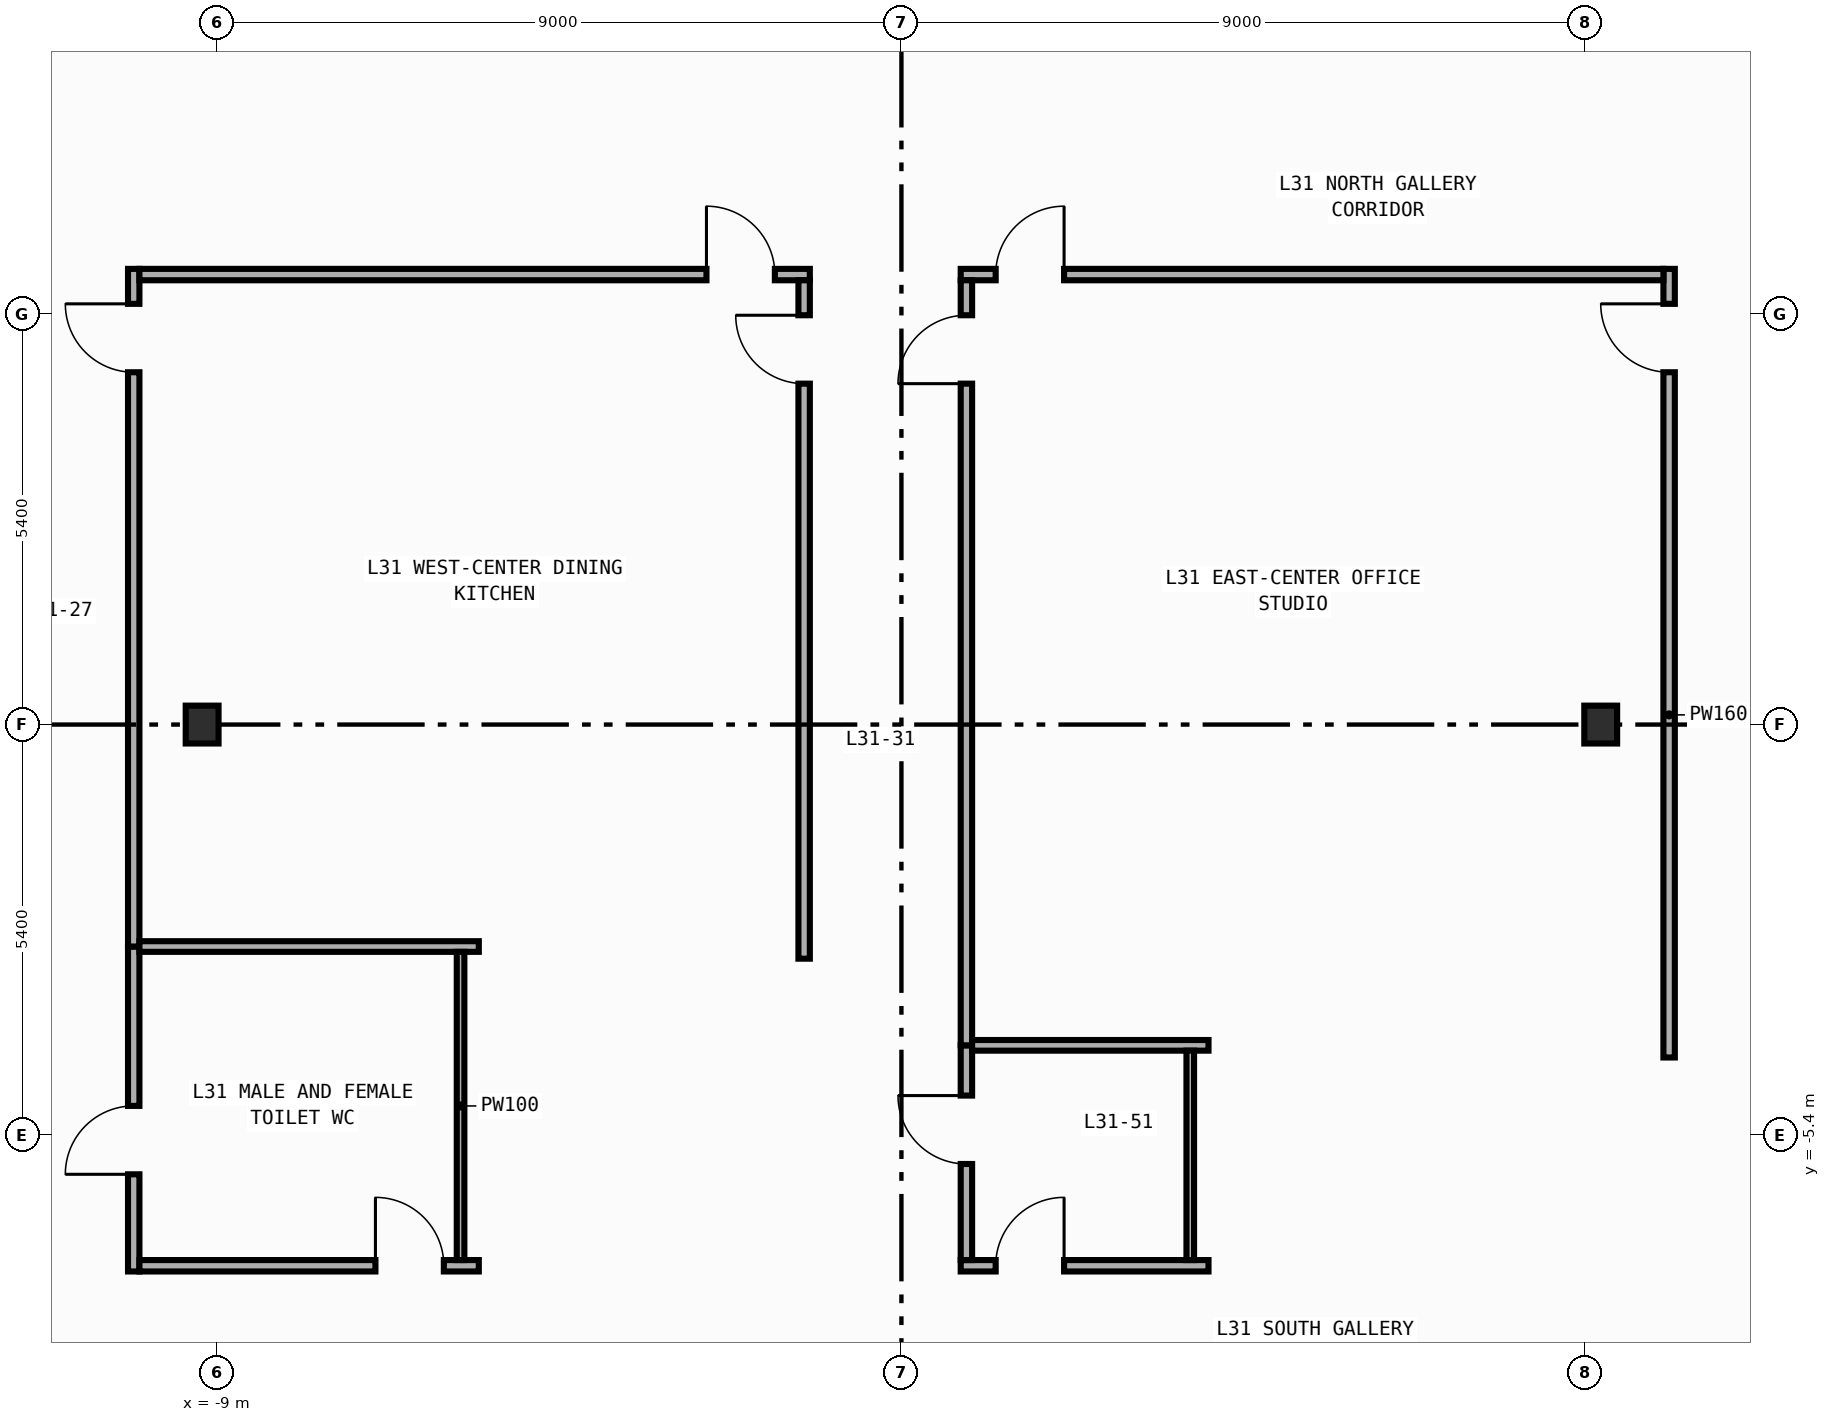
"""IFC4 building model, lengths in metres.
Left out: names, types, materials, properties, quantities, classifications, styles, units other than length and angle.
Written with IfcOpenShell. Run it as: python <this file> out.ifc"""

import sys

from ifc_helpers import new_model, si_unit, direction, frame, frame_2d, origin, origin_2d, place, context, subcontext, project, spatial, rectangle, i_section, extrude, element, fill, save


model = new_model("IFC4")
c1 = context("Model", 3, precision=1e-05, world=origin(), true_north=direction((0.0, 1.0)))
c2 = subcontext(c1, "Body", "Model", "MODEL_VIEW")
j1 = project(units=[si_unit("LENGTHUNIT", "METRE"), si_unit("PLANEANGLEUNIT", "RADIAN")], contexts=[c1])
p1 = place(None, origin())
s1 = spatial("IfcSite", under=j1, at=p1, CompositionType="ELEMENT")
p2 = place(p1, origin())
s2 = spatial("IfcBuilding", under=s1, at=p2, CompositionType="ELEMENT")
p3 = place(p2, frame((0.0, 0.0, 135.2)))
s3 = spatial("IfcBuildingStorey", under=s2, at=p3, CompositionType="ELEMENT", Elevation=135.2)
for number, where, z_axis, x_axis in (
    (1, (-9.2, 0.0, 0.0), (0.0, 0.0, 1.0), (1.0, 0.0, 0.0)),
    (2, (9.2, 0.0, 0.0), (0.0, 0.0, 1.0), (1.0, 0.0, 0.0)),
):
    element("IfcColumn", number, at=place(p3, frame(where, z_axis=z_axis, x_axis=x_axis)), inside=s3, PredefinedType="COLUMN", context=c2, shape_type="SweptSolid", body=[
        extrude(i_section(OverallWidth=0.432, OverallDepth=0.498, WebThickness=0.045, FlangeThickness=0.07, FilletRadius=0.022, at=origin_2d()), origin(), (0.0, 0.0, 1.0), 4.2),
    ])
p4 = place(p3, frame((-10.1, -7.195, 0.0), z_axis=(0.0, 0.0, 1.0), x_axis=(0.0, 1.0, 0.0)))
e3 = element("IfcWall", 3, at=p4, inside=s3, PredefinedType="PARTITIONING", context=c2, shape_type="SweptSolid", body=[
    extrude(rectangle(XDim=4.275, YDim=0.15, at=frame_2d((2.138, 0.0))), origin(), (0.0, 0.0, 1.0), 3.94),
])
p5 = place(p4, frame((1.278, 0.0, 0.0)))
e4 = element("IfcOpeningElement", 4, at=p5, cuts=e3, PredefinedType="OPENING", context=c2, shape_type="SweptSolid", body=[
    extrude(rectangle(XDim=0.9, YDim=2.15, at=frame_2d((0.45, 1.075))), frame((0.0, 0.085, 0.0), z_axis=(0.0, -1.0, 0.0), x_axis=(1.0, 0.0, 0.0)), (0.0, 0.0, 1.0), 0.17),
])
p6 = place(p3, frame((-10.1, -2.92, 0.0), z_axis=(0.0, 0.0, 1.0), x_axis=(0.0, 1.0, 0.0)))
e5 = element("IfcWall", 5, at=p6, inside=s3, PredefinedType="PARTITIONING", context=c2, shape_type="SweptSolid", body=[
    extrude(rectangle(XDim=8.915, YDim=0.15, at=frame_2d((4.458, 0.0))), origin(), (0.0, 0.0, 1.0), 3.94),
])
p7 = place(p6, frame((7.555, 0.0, 0.0)))
e6 = element("IfcOpeningElement", 6, at=p7, cuts=e5, PredefinedType="OPENING", context=c2, shape_type="SweptSolid", body=[
    extrude(rectangle(XDim=0.9, YDim=2.15, at=frame_2d((0.45, 1.075))), frame((0.0, 0.085, 0.0), z_axis=(0.0, -1.0, 0.0), x_axis=(1.0, 0.0, 0.0)), (0.0, 0.0, 1.0), 0.17),
])
p8 = place(p3, frame((10.1, -4.38, 0.0), z_axis=(0.0, 0.0, 1.0), x_axis=(0.0, 1.0, 0.0)))
e7 = element("IfcWall", 7, at=p8, inside=s3, PredefinedType="PARTITIONING", context=c2, shape_type="SweptSolid", body=[
    extrude(rectangle(XDim=10.375, YDim=0.15, at=frame_2d((5.188, 0.0))), origin(), (0.0, 0.0, 1.0), 3.94),
])
p9 = place(p8, frame((9.015, 0.0, 0.0)))
e8 = element("IfcOpeningElement", 8, at=p9, cuts=e7, PredefinedType="OPENING", context=c2, shape_type="SweptSolid", body=[
    extrude(rectangle(XDim=0.9, YDim=2.15, at=frame_2d((0.45, 1.075))), frame((0.0, 0.085, 0.0), z_axis=(0.0, -1.0, 0.0), x_axis=(1.0, 0.0, 0.0)), (0.0, 0.0, 1.0), 0.17),
])
p10 = place(p3, frame((0.78, 5.92, 0.0), z_axis=(0.0, 0.0, 1.0), x_axis=(1.0, 0.0, 0.0)))
e9 = element("IfcWall", 9, at=p10, inside=s3, PredefinedType="PARTITIONING", context=c2, shape_type="SweptSolid", body=[
    extrude(rectangle(XDim=9.245, YDim=0.15, at=frame_2d((4.623, 0.0))), origin(), (0.0, 0.0, 1.0), 3.94),
])
p11 = place(p10, frame((0.46, 0.0, 0.0)))
e10 = element("IfcOpeningElement", 10, at=p11, cuts=e9, PredefinedType="OPENING", context=c2, shape_type="SweptSolid", body=[
    extrude(rectangle(XDim=0.9, YDim=2.15, at=frame_2d((0.45, 1.075))), frame((0.0, 0.085, 0.0), z_axis=(0.0, -1.0, 0.0), x_axis=(1.0, 0.0, 0.0)), (0.0, 0.0, 1.0), 0.17),
])
p12 = place(p3, frame((-10.025, 5.92, 0.0), z_axis=(0.0, 0.0, 1.0), x_axis=(1.0, 0.0, 0.0)))
e11 = element("IfcWall", 11, at=p12, inside=s3, PredefinedType="PARTITIONING", context=c2, shape_type="SweptSolid", body=[
    extrude(rectangle(XDim=8.82, YDim=0.15, at=frame_2d((4.41, 0.0))), origin(), (0.0, 0.0, 1.0), 3.94),
])
p13 = place(p12, frame((7.46, 0.0, 0.0)))
e12 = element("IfcOpeningElement", 12, at=p13, cuts=e11, PredefinedType="OPENING", context=c2, shape_type="SweptSolid", body=[
    extrude(rectangle(XDim=0.9, YDim=2.15, at=frame_2d((0.45, 1.075))), frame((0.0, 0.085, 0.0), z_axis=(0.0, -1.0, 0.0), x_axis=(1.0, 0.0, 0.0)), (0.0, 0.0, 1.0), 0.17),
])
p14 = place(p3, frame((0.78, -7.12, 0.0), z_axis=(0.0, 0.0, 1.0), x_axis=(1.0, 0.0, 0.0)))
e13 = element("IfcWall", 13, at=p14, inside=s3, PredefinedType="PARTITIONING", context=c2, shape_type="SweptSolid", body=[
    extrude(rectangle(XDim=3.26, YDim=0.15, at=frame_2d((1.63, 0.0))), origin(), (0.0, 0.0, 1.0), 3.94),
])
p15 = place(p14, frame((0.46, 0.0, 0.0)))
e14 = element("IfcOpeningElement", 14, at=p15, cuts=e13, PredefinedType="OPENING", context=c2, shape_type="SweptSolid", body=[
    extrude(rectangle(XDim=0.9, YDim=2.15, at=frame_2d((0.45, 1.075))), frame((0.0, 0.085, 0.0), z_axis=(0.0, -1.0, 0.0), x_axis=(1.0, 0.0, 0.0)), (0.0, 0.0, 1.0), 0.17),
])
p16 = place(p3, frame((-10.025, -7.12, 0.0), z_axis=(0.0, 0.0, 1.0), x_axis=(1.0, 0.0, 0.0)))
e15 = element("IfcWall", 15, at=p16, inside=s3, PredefinedType="PARTITIONING", context=c2, shape_type="SweptSolid", body=[
    extrude(rectangle(XDim=4.465, YDim=0.15, at=frame_2d((2.232, 0.0))), origin(), (0.0, 0.0, 1.0), 3.94),
])
p17 = place(p16, frame((3.105, 0.0, 0.0)))
e16 = element("IfcOpeningElement", 16, at=p17, cuts=e15, PredefinedType="OPENING", context=c2, shape_type="SweptSolid", body=[
    extrude(rectangle(XDim=0.9, YDim=2.15, at=frame_2d((0.45, 1.075))), frame((0.0, 0.085, 0.0), z_axis=(0.0, -1.0, 0.0), x_axis=(1.0, 0.0, 0.0)), (0.0, 0.0, 1.0), 0.17),
])
p18 = place(p3, frame((0.855, -7.045, 0.0), z_axis=(0.0, 0.0, 1.0), x_axis=(0.0, 1.0, 0.0)))
e17 = element("IfcWall", 17, at=p18, inside=s3, PredefinedType="PARTITIONING", context=c2, shape_type="SweptSolid", body=[
    extrude(rectangle(XDim=2.825, YDim=0.15, at=frame_2d((1.413, 0.0))), origin(), (0.0, 0.0, 1.0), 3.94),
])
p19 = place(p18, frame((1.264, 0.0, 0.0)))
e18 = element("IfcOpeningElement", 18, at=p19, cuts=e17, PredefinedType="OPENING", context=c2, shape_type="SweptSolid", body=[
    extrude(rectangle(XDim=0.9, YDim=2.15, at=frame_2d((0.45, 1.075))), frame((0.0, 0.085, 0.0), z_axis=(0.0, -1.0, 0.0), x_axis=(1.0, 0.0, 0.0)), (0.0, 0.0, 1.0), 0.17),
])
p20 = place(p3, frame((0.855, -4.22, 0.0), z_axis=(0.0, 0.0, 1.0), x_axis=(0.0, 1.0, 0.0)))
e19 = element("IfcWall", 19, at=p20, inside=s3, PredefinedType="PARTITIONING", context=c2, shape_type="SweptSolid", body=[
    extrude(rectangle(XDim=10.065, YDim=0.15, at=frame_2d((5.032, 0.0))), origin(), (0.0, 0.0, 1.0), 3.94),
])
p21 = place(p20, frame((8.705, 0.0, 0.0)))
e20 = element("IfcOpeningElement", 20, at=p21, cuts=e19, PredefinedType="OPENING", context=c2, shape_type="SweptSolid", body=[
    extrude(rectangle(XDim=0.9, YDim=2.15, at=frame_2d((0.45, 1.075))), frame((0.0, 0.085, 0.0), z_axis=(0.0, -1.0, 0.0), x_axis=(1.0, 0.0, 0.0)), (0.0, 0.0, 1.0), 0.17),
])
p22 = place(p3, frame((-1.28, -3.08, 0.0), z_axis=(0.0, 0.0, 1.0), x_axis=(0.0, 1.0, 0.0)))
e21 = element("IfcWall", 21, at=p22, inside=s3, PredefinedType="PARTITIONING", context=c2, shape_type="SweptSolid", body=[
    extrude(rectangle(XDim=8.925, YDim=0.15, at=frame_2d((4.462, 0.0))), origin(), (0.0, 0.0, 1.0), 3.94),
])
p23 = place(p22, frame((7.565, 0.0, 0.0)))
e22 = element("IfcOpeningElement", 22, at=p23, cuts=e21, PredefinedType="OPENING", context=c2, shape_type="SweptSolid", body=[
    extrude(rectangle(XDim=0.9, YDim=2.15, at=frame_2d((0.45, 1.075))), frame((0.0, 0.085, 0.0), z_axis=(0.0, -1.0, 0.0), x_axis=(1.0, 0.0, 0.0)), (0.0, 0.0, 1.0), 0.17),
])
p24 = place(p3, frame((0.93, -4.22, 0.0), z_axis=(0.0, 0.0, 1.0), x_axis=(1.0, 0.0, 0.0)))
e23 = element("IfcWall", 23, at=p24, inside=s3, PredefinedType="PARTITIONING", context=c2, shape_type="SweptSolid", body=[
    extrude(rectangle(XDim=3.11, YDim=0.14, at=frame_2d((1.555, 0.0))), origin(), (0.0, 0.0, 1.0), 3.94),
])
p25 = place(p3, frame((-10.025, -2.92, 0.0), z_axis=(0.0, 0.0, 1.0), x_axis=(1.0, 0.0, 0.0)))
e24 = element("IfcWall", 24, at=p25, inside=s3, PredefinedType="PARTITIONING", context=c2, shape_type="SweptSolid", body=[
    extrude(rectangle(XDim=4.465, YDim=0.14, at=frame_2d((2.232, 0.0))), origin(), (0.0, 0.0, 1.0), 3.94),
])
p26 = place(p3, frame((3.8, -4.29, 0.0), z_axis=(0.0, 0.0, 1.0), x_axis=(0.0, -1.0, 0.0)))
e25 = element("IfcWall", 25, at=p26, inside=s3, PredefinedType="PARTITIONING", context=c2, shape_type="SweptSolid", body=[
    extrude(rectangle(XDim=2.755, YDim=0.1, at=frame_2d((1.377, 0.0))), origin(), (0.0, 0.0, 1.0), 3.94),
])
p27 = place(p3, frame((-5.8, -2.99, 0.0), z_axis=(0.0, 0.0, 1.0), x_axis=(0.0, -1.0, 0.0)))
e26 = element("IfcWall", 26, at=p27, inside=s3, PredefinedType="PARTITIONING", context=c2, shape_type="SweptSolid", body=[
    extrude(rectangle(XDim=4.055, YDim=0.1, at=frame_2d((2.027, 0.0))), origin(), (0.0, 0.0, 1.0), 3.94),
])
p28 = place(p5, origin())
e27 = element("IfcDoor", 27, at=p28, inside=s3, OperationType="SINGLE_SWING_LEFT", PredefinedType="DOOR", context=c2, shape_type="SweptSolid", body=[
    extrude(rectangle(XDim=0.9, YDim=2.15, at=frame_2d((0.45, 1.075))), frame((0.0, 0.025, 0.0), z_axis=(0.0, -1.0, 0.0), x_axis=(1.0, 0.0, 0.0)), (0.0, 0.0, 1.0), 0.05),
])
fill(e4, e27)
p29 = place(p7, origin())
e28 = element("IfcDoor", 28, at=p29, inside=s3, OperationType="SINGLE_SWING_RIGHT", PredefinedType="DOOR", context=c2, shape_type="SweptSolid", body=[
    extrude(rectangle(XDim=0.9, YDim=2.15, at=frame_2d((0.45, 1.075))), frame((0.0, 0.025, 0.0), z_axis=(0.0, -1.0, 0.0), x_axis=(1.0, 0.0, 0.0)), (0.0, 0.0, 1.0), 0.05),
])
fill(e6, e28)
p30 = place(p9, origin())
e29 = element("IfcDoor", 29, at=p30, inside=s3, OperationType="SINGLE_SWING_RIGHT", PredefinedType="DOOR", context=c2, shape_type="SweptSolid", body=[
    extrude(rectangle(XDim=0.9, YDim=2.15, at=frame_2d((0.45, 1.075))), frame((0.0, 0.025, 0.0), z_axis=(0.0, -1.0, 0.0), x_axis=(1.0, 0.0, 0.0)), (0.0, 0.0, 1.0), 0.05),
])
fill(e8, e29)
p31 = place(p11, origin())
e30 = element("IfcDoor", 30, at=p31, inside=s3, OperationType="SINGLE_SWING_RIGHT", PredefinedType="DOOR", context=c2, shape_type="SweptSolid", body=[
    extrude(rectangle(XDim=0.9, YDim=2.15, at=frame_2d((0.45, 1.075))), frame((0.0, 0.025, 0.0), z_axis=(0.0, -1.0, 0.0), x_axis=(1.0, 0.0, 0.0)), (0.0, 0.0, 1.0), 0.05),
])
fill(e10, e30)
p32 = place(p13, origin())
e31 = element("IfcDoor", 31, at=p32, inside=s3, OperationType="SINGLE_SWING_LEFT", PredefinedType="DOOR", context=c2, shape_type="SweptSolid", body=[
    extrude(rectangle(XDim=0.9, YDim=2.15, at=frame_2d((0.45, 1.075))), frame((0.0, 0.025, 0.0), z_axis=(0.0, -1.0, 0.0), x_axis=(1.0, 0.0, 0.0)), (0.0, 0.0, 1.0), 0.05),
])
fill(e12, e31)
p33 = place(p15, origin())
e32 = element("IfcDoor", 32, at=p33, inside=s3, OperationType="SINGLE_SWING_RIGHT", PredefinedType="DOOR", context=c2, shape_type="SweptSolid", body=[
    extrude(rectangle(XDim=0.9, YDim=2.15, at=frame_2d((0.45, 1.075))), frame((0.0, 0.025, 0.0), z_axis=(0.0, -1.0, 0.0), x_axis=(1.0, 0.0, 0.0)), (0.0, 0.0, 1.0), 0.05),
])
fill(e14, e32)
p34 = place(p17, origin())
e33 = element("IfcDoor", 33, at=p34, inside=s3, OperationType="SINGLE_SWING_LEFT", PredefinedType="DOOR", context=c2, shape_type="SweptSolid", body=[
    extrude(rectangle(XDim=0.9, YDim=2.15, at=frame_2d((0.45, 1.075))), frame((0.0, 0.025, 0.0), z_axis=(0.0, -1.0, 0.0), x_axis=(1.0, 0.0, 0.0)), (0.0, 0.0, 1.0), 0.05),
])
fill(e16, e33)
p35 = place(p19, origin())
e34 = element("IfcDoor", 34, at=p35, inside=s3, OperationType="SINGLE_SWING_RIGHT", PredefinedType="DOOR", context=c2, shape_type="SweptSolid", body=[
    extrude(rectangle(XDim=0.9, YDim=2.15, at=frame_2d((0.45, 1.075))), frame((0.0, 0.025, 0.0), z_axis=(0.0, -1.0, 0.0), x_axis=(1.0, 0.0, 0.0)), (0.0, 0.0, 1.0), 0.05),
])
fill(e18, e34)
p36 = place(p21, origin())
e35 = element("IfcDoor", 35, at=p36, inside=s3, OperationType="SINGLE_SWING_LEFT", PredefinedType="DOOR", context=c2, shape_type="SweptSolid", body=[
    extrude(rectangle(XDim=0.9, YDim=2.15, at=frame_2d((0.45, 1.075))), frame((0.0, 0.025, 0.0), z_axis=(0.0, -1.0, 0.0), x_axis=(1.0, 0.0, 0.0)), (0.0, 0.0, 1.0), 0.05),
])
fill(e20, e35)
p37 = place(p23, origin())
e36 = element("IfcDoor", 36, at=p37, inside=s3, OperationType="SINGLE_SWING_RIGHT", PredefinedType="DOOR", context=c2, shape_type="SweptSolid", body=[
    extrude(rectangle(XDim=0.9, YDim=2.15, at=frame_2d((0.45, 1.075))), frame((0.0, 0.025, 0.0), z_axis=(0.0, -1.0, 0.0), x_axis=(1.0, 0.0, 0.0)), (0.0, 0.0, 1.0), 0.05),
])
fill(e22, e36)
save(model, sys.argv[1])
